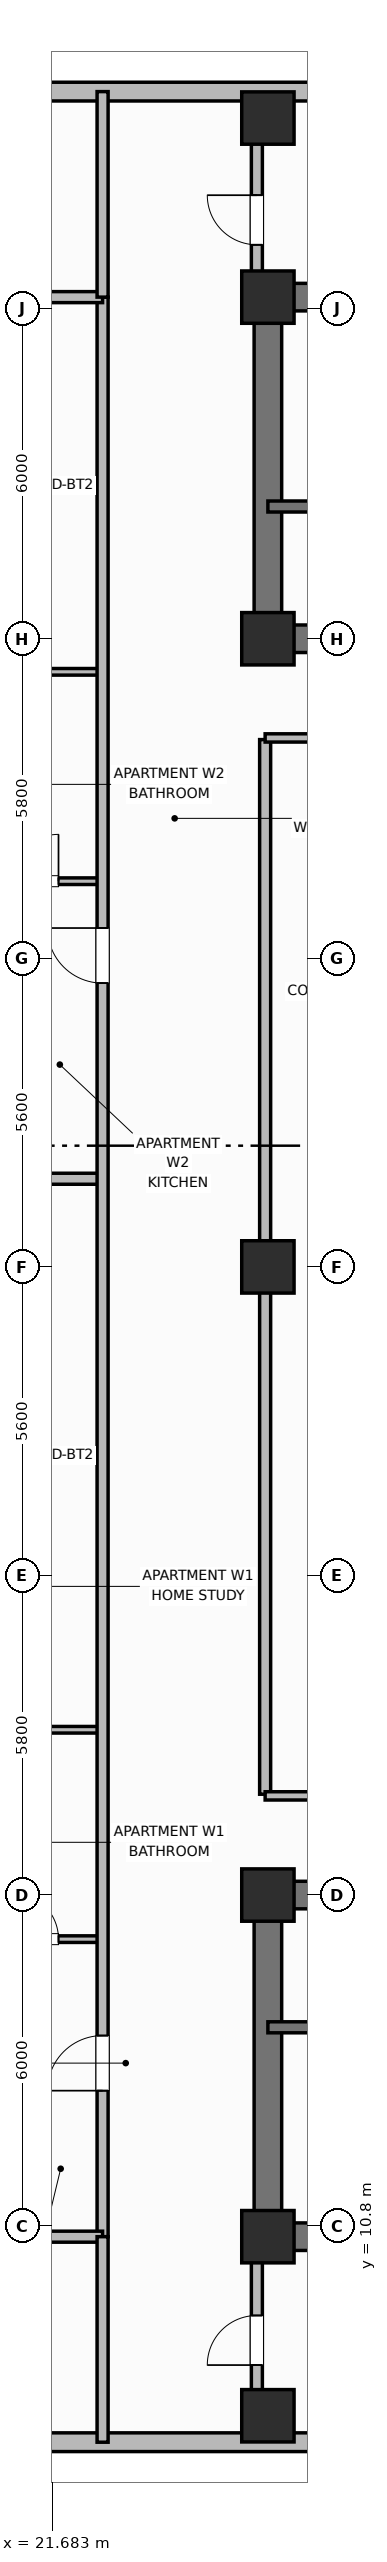
"""IFC4 building model, lengths in metres.
Left out: names, types, materials, properties, quantities, classifications, styles, units other than length and angle.
Written with IfcOpenShell. Run it as: python <this file> out.ifc"""

import sys

from ifc_helpers import new_model, si_unit, direction, frame, frame_2d, origin, origin_2d, place, context, subcontext, project, spatial, rectangle, extrude, element, fill, save


model = new_model("IFC4")
c1 = context("Model", 3, precision=1e-05, world=origin(), true_north=direction((0.0, 1.0)))
c2 = subcontext(c1, "Body", "Model", "MODEL_VIEW")
j1 = project(units=[si_unit("LENGTHUNIT", "METRE"), si_unit("PLANEANGLEUNIT", "RADIAN")], contexts=[c1])
p1 = place(None, origin())
s1 = spatial("IfcSite", under=j1, at=p1, CompositionType="ELEMENT")
p2 = place(p1, origin())
s2 = spatial("IfcBuilding", under=s1, at=p2, CompositionType="ELEMENT")
p3 = place(p2, frame((0.0, 0.0, 184.8)))
s3 = spatial("IfcBuildingStorey", under=s2, at=p3, CompositionType="ELEMENT", Elevation=184.8)
p4 = place(p3, frame((52.8, 10.6, 0.0), z_axis=(0.0, 0.0, 1.0), x_axis=(-1.0, 0.0, 0.0)))
e1 = element("IfcWall", 1, at=p4, inside=s3, PredefinedType="SHEAR", context=c2, shape_type="SweptSolid", body=[
    extrude(rectangle(XDim=27.2, YDim=0.5, at=frame_2d((13.6, 0.0))), origin(), (0.0, 0.0, 1.0), 3.7),
])
p5 = place(p3, frame((25.6, 10.85, 0.0), z_axis=(0.0, 0.0, 1.0), x_axis=(0.0, 1.0, 0.0)))
e2 = element("IfcWall", 2, at=p5, inside=s3, PredefinedType="SHEAR", context=c2, shape_type="SweptSolid", body=[
    extrude(rectangle(XDim=5.7, YDim=0.5, at=frame_2d((2.85, 0.0))), origin(), (0.0, 0.0, 1.0), 3.7),
])
p6 = place(p3, frame((25.6, 16.8, 0.0), z_axis=(0.0, 0.0, 1.0), x_axis=(1.0, 0.0, 0.0)))
e3 = element("IfcWall", 3, at=p6, inside=s3, PredefinedType="SHEAR", context=c2, shape_type="SweptSolid", body=[
    extrude(rectangle(XDim=27.2, YDim=0.5, at=frame_2d((13.6, 0.0))), origin(), (0.0, 0.0, 1.0), 3.7),
])
p7 = place(p6, frame((1.9, 0.0, 0.0)))
e4 = element("IfcOpeningElement", 4, at=p7, cuts=e3, PredefinedType="OPENING", context=c2, shape_type="SweptSolid", body=[
    extrude(rectangle(XDim=1.1, YDim=2.15, at=frame_2d((0.55, 1.075))), frame((0.0, 0.26, 0.0), z_axis=(0.0, -1.0, 0.0), x_axis=(1.0, 0.0, 0.0)), (0.0, 0.0, 1.0), 0.52),
])
p8 = place(p6, frame((13.0, 0.0, 0.0)))
e5 = element("IfcOpeningElement", 5, at=p8, cuts=e3, PredefinedType="OPENING", context=c2, shape_type="SweptSolid", body=[
    extrude(rectangle(XDim=1.2, YDim=2.15, at=frame_2d((0.6, 1.075))), frame((0.0, 0.26, 0.0), z_axis=(0.0, -1.0, 0.0), x_axis=(1.0, 0.0, 0.0)), (0.0, 0.0, 1.0), 0.52),
])
p9 = place(p6, frame((21.6, 0.0, 0.0)))
e6 = element("IfcOpeningElement", 6, at=p9, cuts=e3, PredefinedType="OPENING", context=c2, shape_type="SweptSolid", body=[
    extrude(rectangle(XDim=1.0, YDim=2.15, at=frame_2d((0.5, 1.075))), frame((0.0, 0.26, 0.0), z_axis=(0.0, -1.0, 0.0), x_axis=(1.0, 0.0, 0.0)), (0.0, 0.0, 1.0), 0.52),
])
p10 = place(p3, frame((25.6, 45.8, 0.0), z_axis=(0.0, 0.0, 1.0), x_axis=(1.0, 0.0, 0.0)))
e7 = element("IfcWall", 7, at=p10, inside=s3, PredefinedType="SHEAR", context=c2, shape_type="SweptSolid", body=[
    extrude(rectangle(XDim=27.2, YDim=0.5, at=frame_2d((13.6, 0.0))), origin(), (0.0, 0.0, 1.0), 3.7),
])
p11 = place(p3, frame((25.6, 39.85, 0.0), z_axis=(0.0, 0.0, 1.0), x_axis=(0.0, 1.0, 0.0)))
e8 = element("IfcWall", 8, at=p11, inside=s3, PredefinedType="SHEAR", context=c2, shape_type="SweptSolid", body=[
    extrude(rectangle(XDim=5.7, YDim=0.5, at=frame_2d((2.85, 0.0))), origin(), (0.0, 0.0, 1.0), 3.7),
])
p12 = place(p3, frame((52.8, 39.6, 0.0), z_axis=(0.0, 0.0, 1.0), x_axis=(-1.0, 0.0, 0.0)))
e9 = element("IfcWall", 9, at=p12, inside=s3, PredefinedType="SHEAR", context=c2, shape_type="SweptSolid", body=[
    extrude(rectangle(XDim=27.2, YDim=0.5, at=frame_2d((13.6, 0.0))), origin(), (0.0, 0.0, 1.0), 3.7),
])
p13 = place(p12, frame((24.2, 0.0, 0.0)))
e10 = element("IfcOpeningElement", 10, at=p13, cuts=e9, PredefinedType="OPENING", context=c2, shape_type="SweptSolid", body=[
    extrude(rectangle(XDim=1.1, YDim=2.15, at=frame_2d((0.55, 1.075))), frame((0.0, 0.26, 0.0), z_axis=(0.0, -1.0, 0.0), x_axis=(1.0, 0.0, 0.0)), (0.0, 0.0, 1.0), 0.52),
])
p14 = place(p12, frame((15.1, 0.0, 0.0)))
e11 = element("IfcOpeningElement", 11, at=p14, cuts=e9, PredefinedType="OPENING", context=c2, shape_type="SweptSolid", body=[
    extrude(rectangle(XDim=1.2, YDim=2.15, at=frame_2d((0.6, 1.075))), frame((0.0, 0.26, 0.0), z_axis=(0.0, -1.0, 0.0), x_axis=(1.0, 0.0, 0.0)), (0.0, 0.0, 1.0), 0.52),
])
p15 = place(p12, frame((11.6, 0.0, 0.0)))
e12 = element("IfcOpeningElement", 12, at=p15, cuts=e9, PredefinedType="OPENING", context=c2, shape_type="SweptSolid", body=[
    extrude(rectangle(XDim=0.9, YDim=2.1, at=frame_2d((0.45, 1.05))), frame((0.0, 0.26, 0.0), z_axis=(0.0, -1.0, 0.0), x_axis=(1.0, 0.0, 0.0)), (0.0, 0.0, 1.0), 0.52),
])
p16 = place(p12, frame((7.35, 0.0, 0.0)))
e13 = element("IfcOpeningElement", 13, at=p16, cuts=e9, PredefinedType="OPENING", context=c2, shape_type="SweptSolid", body=[
    extrude(rectangle(XDim=0.85, YDim=2.1, at=frame_2d((0.425, 1.05))), frame((0.0, 0.26, 0.0), z_axis=(0.0, -1.0, 0.0), x_axis=(1.0, 0.0, 0.0)), (0.0, 0.0, 1.0), 0.52),
])
p17 = place(p12, frame((3.6, 0.0, 0.0)))
e14 = element("IfcOpeningElement", 14, at=p17, cuts=e9, PredefinedType="OPENING", context=c2, shape_type="SweptSolid", body=[
    extrude(rectangle(XDim=1.0, YDim=2.15, at=frame_2d((0.5, 1.075))), frame((0.0, 0.26, 0.0), z_axis=(0.0, -1.0, 0.0), x_axis=(1.0, 0.0, 0.0)), (0.0, 0.0, 1.0), 0.52),
])
for number, where, z_axis, x_axis in (
    (15, (25.6, 10.6, 0.0), (0.0, 0.0, 1.0), (1.0, 0.0, 0.0)),
    (16, (25.6, 16.8, 0.0), (0.0, 0.0, 1.0), (1.0, 0.0, 0.0)),
    (17, (25.6, 39.6, 0.0), (0.0, 0.0, 1.0), (1.0, 0.0, 0.0)),
    (18, (25.6, 45.8, 0.0), (0.0, 0.0, 1.0), (1.0, 0.0, 0.0)),
    (19, (25.6, 28.2, 0.0), (0.0, 0.0, 1.0), (1.0, 0.0, 0.0)),
    (20, (25.6, 7.35, 0.0), (0.0, 0.0, 1.0), (1.0, 0.0, 0.0)),
    (21, (25.6, 49.05, 0.0), (0.0, 0.0, 1.0), (1.0, 0.0, 0.0)),
):
    element("IfcColumn", number, at=place(p3, frame(where, z_axis=z_axis, x_axis=x_axis)), inside=s3, PredefinedType="COLUMN", context=c2, shape_type="SweptSolid", body=[
        extrude(rectangle(XDim=0.95, YDim=0.95, at=origin_2d()), origin(), (0.0, 0.0, 1.0), 3.7),
    ])
p18 = place(p3, frame((20.2, 6.87, 0.0), z_axis=(0.0, 0.0, 1.0), x_axis=(1.0, 0.0, 0.0)))
e22 = element("IfcWall", 22, at=p18, inside=s3, PredefinedType="SOLIDWALL", context=c2, shape_type="SweptSolid", body=[
    extrude(rectangle(XDim=15.8, YDim=0.34, at=frame_2d((7.9, 0.0))), origin(), (0.0, 0.0, 1.0), 2.72),
])
p19 = place(p18, frame((8.562, 0.0, 0.7)))
e23 = element("IfcOpeningElement", 23, at=p19, cuts=e22, PredefinedType="OPENING", context=c2, shape_type="SweptSolid", body=[
    extrude(rectangle(XDim=1.6, YDim=1.9, at=frame_2d((0.8, 0.95))), frame((0.0, 0.18, 0.0), z_axis=(0.0, -1.0, 0.0), x_axis=(1.0, 0.0, 0.0)), (0.0, 0.0, 1.0), 0.36),
])
p20 = place(p18, frame((11.837, 0.0, 0.7)))
e24 = element("IfcOpeningElement", 24, at=p20, cuts=e22, PredefinedType="OPENING", context=c2, shape_type="SweptSolid", body=[
    extrude(rectangle(XDim=1.6, YDim=1.9, at=frame_2d((0.8, 0.95))), frame((0.0, 0.18, 0.0), z_axis=(0.0, -1.0, 0.0), x_axis=(1.0, 0.0, 0.0)), (0.0, 0.0, 1.0), 0.36),
])
p21 = place(p3, frame((36.0, 49.53, 0.0), z_axis=(0.0, 0.0, 1.0), x_axis=(-1.0, 0.0, 0.0)))
e25 = element("IfcWall", 25, at=p21, inside=s3, PredefinedType="SOLIDWALL", context=c2, shape_type="SweptSolid", body=[
    extrude(rectangle(XDim=15.8, YDim=0.34, at=frame_2d((7.9, 0.0))), origin(), (0.0, 0.0, 1.0), 2.72),
])
p22 = place(p21, frame((6.85, 0.0, 0.7)))
e26 = element("IfcOpeningElement", 26, at=p22, cuts=e25, PredefinedType="OPENING", context=c2, shape_type="SweptSolid", body=[
    extrude(rectangle(XDim=2.1, YDim=1.9, at=frame_2d((1.05, 0.95))), frame((0.0, 0.18, 0.0), z_axis=(0.0, -1.0, 0.0), x_axis=(1.0, 0.0, 0.0)), (0.0, 0.0, 1.0), 0.36),
])
p23 = place(p3, frame((25.6, 14.4, 0.0), z_axis=(0.0, 0.0, 1.0), x_axis=(1.0, 0.0, 0.0)))
e27 = element("IfcWall", 27, at=p23, inside=s3, PredefinedType="SHEAR", context=c2, shape_type="SweptSolid", body=[
    extrude(rectangle(XDim=9.55, YDim=0.2, at=frame_2d((4.775, 0.0))), origin(), (0.0, 0.0, 1.0), 3.7),
])
p24 = place(p23, frame((1.05, 0.0, 0.0)))
e28 = element("IfcOpeningElement", 28, at=p24, cuts=e27, PredefinedType="OPENING", context=c2, shape_type="SweptSolid", body=[
    extrude(rectangle(XDim=1.1, YDim=2.15, at=frame_2d((0.55, 1.075))), frame((0.0, 0.11, 0.0), z_axis=(0.0, -1.0, 0.0), x_axis=(1.0, 0.0, 0.0)), (0.0, 0.0, 1.0), 0.22),
])
p25 = place(p3, frame((35.15, 42.0, 0.0), z_axis=(0.0, 0.0, 1.0), x_axis=(-1.0, 0.0, 0.0)))
e29 = element("IfcWall", 29, at=p25, inside=s3, PredefinedType="SHEAR", context=c2, shape_type="SweptSolid", body=[
    extrude(rectangle(XDim=9.55, YDim=0.2, at=frame_2d((4.775, 0.0))), origin(), (0.0, 0.0, 1.0), 3.7),
])
p26 = place(p25, frame((7.25, 0.0, 0.0)))
e30 = element("IfcOpeningElement", 30, at=p26, cuts=e29, PredefinedType="OPENING", context=c2, shape_type="SweptSolid", body=[
    extrude(rectangle(XDim=1.1, YDim=2.15, at=frame_2d((0.55, 1.075))), frame((0.0, 0.11, 0.0), z_axis=(0.0, -1.0, 0.0), x_axis=(1.0, 0.0, 0.0)), (0.0, 0.0, 1.0), 0.22),
])
p27 = place(p3, frame((25.55, 18.63, 0.0), z_axis=(0.0, 0.0, 1.0), x_axis=(0.0, 1.0, 0.0)))
e31 = element("IfcWall", 31, at=p27, inside=s3, PredefinedType="PARTITIONING", context=c2, shape_type="SweptSolid", body=[
    extrude(rectangle(XDim=19.14, YDim=0.2, at=frame_2d((9.57, 0.0))), origin(), (0.0, 0.0, 1.0), 2.55),
])
for number, where, z_axis, x_axis in (
    (32, (25.55, 18.6, 0.0), (0.0, 0.0, 1.0), (1.0, 0.0, 0.0)),
    (33, (25.55, 37.8, 0.0), (0.0, 0.0, 1.0), (1.0, 0.0, 0.0)),
):
    element("IfcWall", number, at=place(p3, frame(where, z_axis=z_axis, x_axis=x_axis)), inside=s3, PredefinedType="PARTITIONING", context=c2, shape_type="SweptSolid", body=[
        extrude(rectangle(XDim=3.5, YDim=0.15, at=frame_2d((1.75, 0.0))), origin(), (0.0, 0.0, 1.0), 2.55),
    ])
p28 = place(p3, frame((20.35, 16.0, 0.0), z_axis=(0.0, 0.0, 1.0), x_axis=(1.0, 0.0, 0.0)))
e34 = element("IfcWall", 34, at=p28, inside=s3, PredefinedType="PARTITIONING", context=c2, shape_type="SweptSolid", body=[
    extrude(rectangle(XDim=2.25, YDim=0.12, at=frame_2d((1.125, 0.0))), origin(), (0.0, 0.0, 1.0), 2.55),
])
p29 = place(p28, frame((0.6, 0.0, 0.0)))
e35 = element("IfcOpeningElement", 35, at=p29, cuts=e34, PredefinedType="OPENING", context=c2, shape_type="SweptSolid", body=[
    extrude(rectangle(XDim=0.85, YDim=2.1, at=frame_2d((0.425, 1.05))), frame((0.0, 0.07, 0.0), z_axis=(0.0, -1.0, 0.0), x_axis=(1.0, 0.0, 0.0)), (0.0, 0.0, 1.0), 0.14),
])
p30 = place(p3, frame((20.35, 19.8, 0.0), z_axis=(0.0, 0.0, 1.0), x_axis=(1.0, 0.0, 0.0)))
e36 = element("IfcWall", 36, at=p30, inside=s3, PredefinedType="PARTITIONING", context=c2, shape_type="SweptSolid", body=[
    extrude(rectangle(XDim=2.25, YDim=0.12, at=frame_2d((1.125, 0.0))), origin(), (0.0, 0.0, 1.0), 2.55),
])
p31 = place(p3, frame((16.97, 29.8, 0.0), z_axis=(0.0, 0.0, 1.0), x_axis=(1.0, 0.0, 0.0)))
e37 = element("IfcWall", 37, at=p31, inside=s3, PredefinedType="PARTITIONING", context=c2, shape_type="SweptSolid", body=[
    extrude(rectangle(XDim=5.63, YDim=0.2, at=frame_2d((2.815, 0.0))), origin(), (0.0, 0.0, 1.0), 2.55),
])
p32 = place(p3, frame((20.35, 35.2, 0.0), z_axis=(0.0, 0.0, 1.0), x_axis=(1.0, 0.0, 0.0)))
e38 = element("IfcWall", 38, at=p32, inside=s3, PredefinedType="PARTITIONING", context=c2, shape_type="SweptSolid", body=[
    extrude(rectangle(XDim=2.25, YDim=0.12, at=frame_2d((1.125, 0.0))), origin(), (0.0, 0.0, 1.0), 2.55),
])
p33 = place(p32, frame((0.6, 0.0, 0.0)))
e39 = element("IfcOpeningElement", 39, at=p33, cuts=e38, PredefinedType="OPENING", context=c2, shape_type="SweptSolid", body=[
    extrude(rectangle(XDim=0.85, YDim=2.1, at=frame_2d((0.425, 1.05))), frame((0.0, 0.07, 0.0), z_axis=(0.0, -1.0, 0.0), x_axis=(1.0, 0.0, 0.0)), (0.0, 0.0, 1.0), 0.14),
])
p34 = place(p3, frame((20.35, 39.0, 0.0), z_axis=(0.0, 0.0, 1.0), x_axis=(1.0, 0.0, 0.0)))
e40 = element("IfcWall", 40, at=p34, inside=s3, PredefinedType="PARTITIONING", context=c2, shape_type="SweptSolid", body=[
    extrude(rectangle(XDim=2.25, YDim=0.12, at=frame_2d((1.125, 0.0))), origin(), (0.0, 0.0, 1.0), 2.55),
])
p35 = place(p3, frame((22.6, 10.6, 0.0), z_axis=(0.0, 0.0, 1.0), x_axis=(0.0, 1.0, 0.0)))
e41 = element("IfcWall", 41, at=p35, inside=s3, PredefinedType="PARTITIONING", context=c2, shape_type="SweptSolid", body=[
    extrude(rectangle(XDim=35.2, YDim=0.2, at=frame_2d((17.6, 0.0))), origin(), (0.0, 0.0, 1.0), 2.55),
])
p36 = place(p35, frame((2.65, 0.0, 0.0)))
e42 = element("IfcOpeningElement", 42, at=p36, cuts=e41, PredefinedType="OPENING", context=c2, shape_type="SweptSolid", body=[
    extrude(rectangle(XDim=1.0, YDim=2.15, at=frame_2d((0.5, 1.075))), frame((0.0, 0.11, 0.0), z_axis=(0.0, -1.0, 0.0), x_axis=(1.0, 0.0, 0.0)), (0.0, 0.0, 1.0), 0.22),
])
p37 = place(p35, frame((22.75, 0.0, 0.0)))
e43 = element("IfcOpeningElement", 43, at=p37, cuts=e41, PredefinedType="OPENING", context=c2, shape_type="SweptSolid", body=[
    extrude(rectangle(XDim=1.0, YDim=2.15, at=frame_2d((0.5, 1.075))), frame((0.0, 0.11, 0.0), z_axis=(0.0, -1.0, 0.0), x_axis=(1.0, 0.0, 0.0)), (0.0, 0.0, 1.0), 0.22),
])
for number, where, z_axis, x_axis in (
    (44, (16.99, 10.6, 0.0), (0.0, 0.0, 1.0), (1.0, 0.0, 0.0)),
    (45, (16.99, 45.8, 0.0), (0.0, 0.0, 1.0), (1.0, 0.0, 0.0)),
):
    element("IfcWall", number, at=place(p3, frame(where, z_axis=z_axis, x_axis=x_axis)), inside=s3, PredefinedType="PARTITIONING", context=c2, shape_type="SweptSolid", body=[
        extrude(rectangle(XDim=5.61, YDim=0.2, at=frame_2d((2.805, 0.0))), origin(), (0.0, 0.0, 1.0), 2.55),
    ])
for number, where, z_axis, x_axis in (
    (46, (22.6, 6.87, 0.0), (0.0, 0.0, 1.0), (0.0, 1.0, 0.0)),
    (47, (22.6, 45.8, 0.0), (0.0, 0.0, 1.0), (0.0, 1.0, 0.0)),
):
    element("IfcWall", number, at=place(p3, frame(where, z_axis=z_axis, x_axis=x_axis)), inside=s3, PredefinedType="PARTITIONING", context=c2, shape_type="SweptSolid", body=[
        extrude(rectangle(XDim=3.73, YDim=0.2, at=frame_2d((1.865, 0.0))), origin(), (0.0, 0.0, 1.0), 2.55),
    ])
p38 = place(p3, frame((25.4, 7.62, 0.0), z_axis=(0.0, 0.0, 1.0), x_axis=(0.0, 1.0, 0.0)))
e48 = element("IfcWall", 48, at=p38, inside=s3, PredefinedType="PARTITIONING", context=c2, shape_type="SweptSolid", body=[
    extrude(rectangle(XDim=2.68, YDim=0.2, at=frame_2d((1.34, 0.0))), origin(), (0.0, 0.0, 1.0), 2.55),
])
p39 = place(p38, frame((0.65, 0.0, 0.0)))
e49 = element("IfcOpeningElement", 49, at=p39, cuts=e48, PredefinedType="OPENING", context=c2, shape_type="SweptSolid", body=[
    extrude(rectangle(XDim=0.9, YDim=2.1, at=frame_2d((0.45, 1.05))), frame((0.0, 0.11, 0.0), z_axis=(0.0, -1.0, 0.0), x_axis=(1.0, 0.0, 0.0)), (0.0, 0.0, 1.0), 0.22),
])
p40 = place(p3, frame((25.4, 46.1, 0.0), z_axis=(0.0, 0.0, 1.0), x_axis=(0.0, 1.0, 0.0)))
e50 = element("IfcWall", 50, at=p40, inside=s3, PredefinedType="PARTITIONING", context=c2, shape_type="SweptSolid", body=[
    extrude(rectangle(XDim=2.68, YDim=0.2, at=frame_2d((1.34, 0.0))), origin(), (0.0, 0.0, 1.0), 2.55),
])
p41 = place(p40, frame((0.65, 0.0, 0.0)))
e51 = element("IfcOpeningElement", 51, at=p41, cuts=e50, PredefinedType="OPENING", context=c2, shape_type="SweptSolid", body=[
    extrude(rectangle(XDim=0.9, YDim=2.1, at=frame_2d((0.45, 1.05))), frame((0.0, 0.11, 0.0), z_axis=(0.0, -1.0, 0.0), x_axis=(1.0, 0.0, 0.0)), (0.0, 0.0, 1.0), 0.22),
])
p42 = place(p29, origin())
e52 = element("IfcDoor", 52, at=p42, inside=s3, OperationType="SINGLE_SWING_LEFT", PredefinedType="DOOR", context=c2, shape_type="SweptSolid", body=[
    extrude(rectangle(XDim=0.85, YDim=2.1, at=frame_2d((0.425, 1.05))), frame((0.0, 0.025, 0.0), z_axis=(0.0, -1.0, 0.0), x_axis=(1.0, 0.0, 0.0)), (0.0, 0.0, 1.0), 0.05),
])
fill(e35, e52)
p43 = place(p33, origin())
e53 = element("IfcDoor", 53, at=p43, inside=s3, OperationType="SINGLE_SWING_RIGHT", PredefinedType="DOOR", context=c2, shape_type="SweptSolid", body=[
    extrude(rectangle(XDim=0.85, YDim=2.1, at=frame_2d((0.425, 1.05))), frame((0.0, 0.025, 0.0), z_axis=(0.0, -1.0, 0.0), x_axis=(1.0, 0.0, 0.0)), (0.0, 0.0, 1.0), 0.05),
])
fill(e39, e53)
p44 = place(p36, origin())
e54 = element("IfcDoor", 54, at=p44, inside=s3, OperationType="SINGLE_SWING_LEFT", PredefinedType="DOOR", context=c2, shape_type="SweptSolid", body=[
    extrude(rectangle(XDim=1.0, YDim=2.15, at=frame_2d((0.5, 1.075))), frame((0.0, 0.025, 0.0), z_axis=(0.0, -1.0, 0.0), x_axis=(1.0, 0.0, 0.0)), (0.0, 0.0, 1.0), 0.05),
])
fill(e42, e54)
p45 = place(p37, origin())
e55 = element("IfcDoor", 55, at=p45, inside=s3, OperationType="SINGLE_SWING_RIGHT", PredefinedType="DOOR", context=c2, shape_type="SweptSolid", body=[
    extrude(rectangle(XDim=1.0, YDim=2.15, at=frame_2d((0.5, 1.075))), frame((0.0, 0.025, 0.0), z_axis=(0.0, -1.0, 0.0), x_axis=(1.0, 0.0, 0.0)), (0.0, 0.0, 1.0), 0.05),
])
fill(e43, e55)
p46 = place(p39, origin())
e56 = element("IfcDoor", 56, at=p46, inside=s3, OperationType="SINGLE_SWING_LEFT", PredefinedType="DOOR", context=c2, shape_type="SweptSolid", body=[
    extrude(rectangle(XDim=0.9, YDim=2.1, at=frame_2d((0.45, 1.05))), frame((0.0, 0.025, 0.0), z_axis=(0.0, -1.0, 0.0), x_axis=(1.0, 0.0, 0.0)), (0.0, 0.0, 1.0), 0.05),
])
fill(e49, e56)
p47 = place(p41, origin())
e57 = element("IfcDoor", 57, at=p47, inside=s3, OperationType="SINGLE_SWING_RIGHT", PredefinedType="DOOR", context=c2, shape_type="SweptSolid", body=[
    extrude(rectangle(XDim=0.9, YDim=2.1, at=frame_2d((0.45, 1.05))), frame((0.0, 0.025, 0.0), z_axis=(0.0, -1.0, 0.0), x_axis=(1.0, 0.0, 0.0)), (0.0, 0.0, 1.0), 0.05),
])
fill(e51, e57)
save(model, sys.argv[1])
